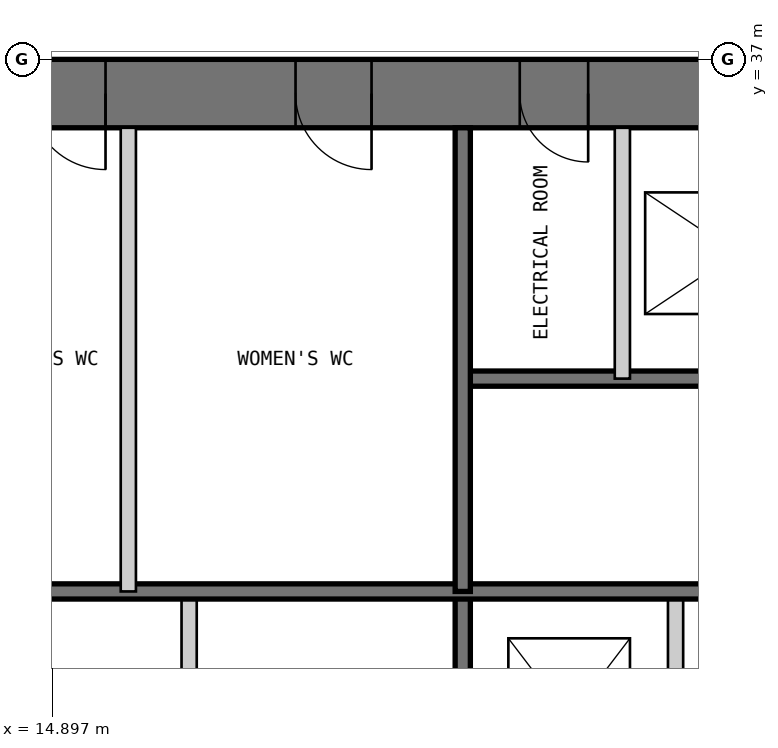
"""IFC4 building model, lengths in metres.
Left out: names, types, materials, properties, quantities, classifications, styles, units other than length and angle.
Written with IfcOpenShell. Run it as: python <this file> out.ifc"""

import sys

from ifc_helpers import new_model, si_unit, direction, frame, frame_2d, origin, place, context, subcontext, project, spatial, polyline, rectangle, outline, extrude, element, fill, save


model = new_model("IFC4")
c1 = context("Model", 3, precision=1e-05, world=origin(), true_north=direction((0.0, 1.0)))
c2 = subcontext(c1, "Body", "Model", "MODEL_VIEW")
j1 = project(units=[si_unit("LENGTHUNIT", "METRE"), si_unit("PLANEANGLEUNIT", "RADIAN")], contexts=[c1])
p1 = place(None, origin())
s1 = spatial("IfcSite", under=j1, at=p1, CompositionType="ELEMENT")
p2 = place(p1, origin())
s2 = spatial("IfcBuilding", under=s1, at=p2, CompositionType="ELEMENT")
p3 = place(p2, frame((0.0, 0.0, 146.4)))
s3 = spatial("IfcBuildingStorey", under=s2, at=p3, CompositionType="ELEMENT", Elevation=146.4)
p4 = place(p3, frame((37.0, 36.55, 0.0), z_axis=(0.0, 0.0, 1.0), x_axis=(-1.0, 0.0, 0.0)))
e1 = element("IfcWall", 1, at=p4, inside=s3, PredefinedType="SHEAR", context=c2, shape_type="SweptSolid", body=[
    extrude(outline(polyline([(0.0, -0.45), (24.0, -0.45), (23.1, 0.45), (0.9, 0.45), (0.0, -0.45)])), origin(), (0.0, 0.0, 1.0), 4.0),
])
p5 = place(p4, frame((4.9, 0.0, 0.0)))
e2 = element("IfcOpeningElement", 2, at=p5, cuts=e1, PredefinedType="OPENING", context=c2, shape_type="SweptSolid", body=[
    extrude(rectangle(XDim=1.0, YDim=2.2, at=frame_2d((0.5, 1.1))), frame((0.0, 0.46, 0.0), z_axis=(0.0, -1.0, 0.0), x_axis=(1.0, 0.0, 0.0)), (0.0, 0.0, 1.0), 0.92),
])
p6 = place(p4, frame((8.9, 0.0, 0.0)))
e3 = element("IfcOpeningElement", 3, at=p6, cuts=e1, PredefinedType="OPENING", context=c2, shape_type="SweptSolid", body=[
    extrude(rectangle(XDim=1.1, YDim=2.2, at=frame_2d((0.55, 1.1))), frame((0.0, 0.46, 0.0), z_axis=(0.0, -1.0, 0.0), x_axis=(1.0, 0.0, 0.0)), (0.0, 0.0, 1.0), 0.92),
])
p7 = place(p4, frame((15.05, 0.0, 0.0)))
e4 = element("IfcOpeningElement", 4, at=p7, cuts=e1, PredefinedType="OPENING", context=c2, shape_type="SweptSolid", body=[
    extrude(rectangle(XDim=0.9, YDim=2.2, at=frame_2d((0.45, 1.1))), frame((0.0, 0.46, 0.0), z_axis=(0.0, -1.0, 0.0), x_axis=(1.0, 0.0, 0.0)), (0.0, 0.0, 1.0), 0.92),
])
p8 = place(p4, frame((17.9, 0.0, 0.0)))
e5 = element("IfcOpeningElement", 5, at=p8, cuts=e1, PredefinedType="OPENING", context=c2, shape_type="SweptSolid", body=[
    extrude(rectangle(XDim=1.0, YDim=2.2, at=frame_2d((0.5, 1.1))), frame((0.0, 0.46, 0.0), z_axis=(0.0, -1.0, 0.0), x_axis=(1.0, 0.0, 0.0)), (0.0, 0.0, 1.0), 0.92),
])
p9 = place(p4, frame((21.4, 0.0, 0.0)))
e6 = element("IfcOpeningElement", 6, at=p9, cuts=e1, PredefinedType="OPENING", context=c2, shape_type="SweptSolid", body=[
    extrude(rectangle(XDim=1.0, YDim=2.2, at=frame_2d((0.5, 1.1))), frame((0.0, 0.46, 0.0), z_axis=(0.0, -1.0, 0.0), x_axis=(1.0, 0.0, 0.0)), (0.0, 0.0, 1.0), 0.92),
])
p10 = place(p3, frame((16.7, 13.9, 0.0), z_axis=(0.0, 0.0, 1.0), x_axis=(0.0, 1.0, 0.0)))
e7 = element("IfcWall", 7, at=p10, inside=s3, PredefinedType="PARTITIONING", context=c2, shape_type="SweptSolid", body=[
    extrude(rectangle(XDim=16.1, YDim=0.2, at=frame_2d((8.05, 0.0))), origin(), (0.0, 0.0, 1.0), 3.8),
])
p11 = place(p10, frame((7.95, 0.0, 0.0)))
e8 = element("IfcOpeningElement", 8, at=p11, cuts=e7, PredefinedType="OPENING", context=c2, shape_type="SweptSolid", body=[
    extrude(rectangle(XDim=0.9, YDim=2.2, at=frame_2d((0.45, 1.1))), frame((0.0, 0.11, 0.0), z_axis=(0.0, -1.0, 0.0), x_axis=(1.0, 0.0, 0.0)), (0.0, 0.0, 1.0), 0.22),
])
p12 = place(p10, frame((12.9, 0.0, 0.0)))
e9 = element("IfcOpeningElement", 9, at=p12, cuts=e7, PredefinedType="OPENING", context=c2, shape_type="SweptSolid", body=[
    extrude(rectangle(XDim=0.9, YDim=2.2, at=frame_2d((0.45, 1.1))), frame((0.0, 0.11, 0.0), z_axis=(0.0, -1.0, 0.0), x_axis=(1.0, 0.0, 0.0)), (0.0, 0.0, 1.0), 0.22),
])
p13 = place(p3, frame((20.3, 13.9, 0.0), z_axis=(0.0, 0.0, 1.0), x_axis=(0.0, 1.0, 0.0)))
e10 = element("IfcWall", 10, at=p13, inside=s3, PredefinedType="SOLIDWALL", context=c2, shape_type="SweptSolid", body=[
    extrude(rectangle(XDim=16.1, YDim=0.2, at=frame_2d((8.05, 0.0))), origin(), (0.0, 0.0, 1.0), 3.8),
])
p14 = place(p13, frame((7.217, 0.0, 0.0)))
e11 = element("IfcOpeningElement", 11, at=p14, cuts=e10, PredefinedType="OPENING", context=c2, shape_type="SweptSolid", body=[
    extrude(rectangle(XDim=1.1, YDim=2.2, at=frame_2d((0.55, 1.1))), frame((0.0, 0.11, 0.0), z_axis=(0.0, -1.0, 0.0), x_axis=(1.0, 0.0, 0.0)), (0.0, 0.0, 1.0), 0.22),
])
p15 = place(p13, frame((10.55, 0.0, 0.0)))
e12 = element("IfcOpeningElement", 12, at=p15, cuts=e10, PredefinedType="OPENING", context=c2, shape_type="SweptSolid", body=[
    extrude(rectangle(XDim=1.1, YDim=2.2, at=frame_2d((0.55, 1.1))), frame((0.0, 0.11, 0.0), z_axis=(0.0, -1.0, 0.0), x_axis=(1.0, 0.0, 0.0)), (0.0, 0.0, 1.0), 0.22),
])
p16 = place(p13, frame((13.883, 0.0, 0.0)))
e13 = element("IfcOpeningElement", 13, at=p16, cuts=e10, PredefinedType="OPENING", context=c2, shape_type="SweptSolid", body=[
    extrude(rectangle(XDim=1.1, YDim=2.2, at=frame_2d((0.55, 1.1))), frame((0.0, 0.11, 0.0), z_axis=(0.0, -1.0, 0.0), x_axis=(1.0, 0.0, 0.0)), (0.0, 0.0, 1.0), 0.22),
])
p17 = place(p3, frame((23.1, 20.0, 0.0), z_axis=(0.0, 0.0, 1.0), x_axis=(0.0, 1.0, 0.0)))
e14 = element("IfcWall", 14, at=p17, inside=s3, PredefinedType="PARTITIONING", context=c2, shape_type="SweptSolid", body=[
    extrude(rectangle(XDim=10.0, YDim=0.2, at=frame_2d((5.0, 0.0))), origin(), (0.0, 0.0, 1.0), 3.8),
])
p18 = place(p3, frame((29.7, 32.8, 0.0), z_axis=(0.0, 0.0, 1.0), x_axis=(-1.0, 0.0, 0.0)))
e15 = element("IfcWall", 15, at=p18, inside=s3, PredefinedType="SOLIDWALL", context=c2, shape_type="SweptSolid", body=[
    extrude(rectangle(XDim=9.4, YDim=0.2, at=frame_2d((4.7, 0.0))), origin(), (0.0, 0.0, 1.0), 3.8),
])
p19 = place(p18, frame((0.25, 0.0, 0.0)))
e16 = element("IfcOpeningElement", 16, at=p19, cuts=e15, PredefinedType="OPENING", context=c2, shape_type="SweptSolid", body=[
    extrude(rectangle(XDim=1.0, YDim=2.2, at=frame_2d((0.5, 1.1))), frame((0.0, 0.11, 0.0), z_axis=(0.0, -1.0, 0.0), x_axis=(1.0, 0.0, 0.0)), (0.0, 0.0, 1.0), 0.22),
])
p20 = place(p3, frame((29.7, 30.0, 0.0), z_axis=(0.0, 0.0, 1.0), x_axis=(-1.0, 0.0, 0.0)))
e17 = element("IfcWall", 17, at=p20, inside=s3, PredefinedType="SOLIDWALL", context=c2, shape_type="SweptSolid", body=[
    extrude(rectangle(XDim=15.8, YDim=0.2, at=frame_2d((7.9, 0.0))), origin(), (0.0, 0.0, 1.0), 3.8),
])
p21 = place(p3, frame((22.4, 36.1, 0.0), z_axis=(0.0, 0.0, 1.0), x_axis=(0.0, -1.0, 0.0)))
e18 = element("IfcWall", 18, at=p21, inside=s3, PredefinedType="PARTITIONING", context=c2, shape_type="SweptSolid", body=[
    extrude(rectangle(XDim=3.3, YDim=0.2, at=frame_2d((1.65, 0.0))), origin(), (0.0, 0.0, 1.0), 3.8),
])
p22 = place(p3, frame((20.3, 36.1, 0.0), z_axis=(0.0, 0.0, 1.0), x_axis=(0.0, -1.0, 0.0)))
e19 = element("IfcWall", 19, at=p22, inside=s3, PredefinedType="SOLIDWALL", context=c2, shape_type="SweptSolid", body=[
    extrude(rectangle(XDim=6.1, YDim=0.2, at=frame_2d((3.05, 0.0))), origin(), (0.0, 0.0, 1.0), 3.8),
])
p23 = place(p3, frame((15.9, 36.1, 0.0), z_axis=(0.0, 0.0, 1.0), x_axis=(0.0, -1.0, 0.0)))
e20 = element("IfcWall", 20, at=p23, inside=s3, PredefinedType="PARTITIONING", context=c2, shape_type="SweptSolid", body=[
    extrude(rectangle(XDim=6.1, YDim=0.2, at=frame_2d((3.05, 0.0))), origin(), (0.0, 0.0, 1.0), 3.8),
])
p24 = place(p7, origin())
e21 = element("IfcDoor", 21, at=p24, inside=s3, OperationType="SINGLE_SWING_LEFT", PredefinedType="DOOR", context=c2, shape_type="SweptSolid", body=[
    extrude(rectangle(XDim=0.9, YDim=2.2, at=frame_2d((0.45, 1.1))), frame((0.0, 0.025, 0.0), z_axis=(0.0, -1.0, 0.0), x_axis=(1.0, 0.0, 0.0)), (0.0, 0.0, 1.0), 0.05),
    extrude(outline(polyline([(0.0, 0.0), (0.04, 0.0), (0.04, 2.16), (0.86, 2.16), (0.86, 0.0), (0.9, 0.0), (0.9, 2.2), (0.0, 2.2), (0.0, 0.0)])), frame((0.0, 0.3, 0.0), z_axis=(0.0, -1.0, 0.0), x_axis=(1.0, 0.0, 0.0)), (0.0, 0.0, 1.0), 0.6),
])
fill(e4, e21)
p25 = place(p8, origin())
e22 = element("IfcDoor", 22, at=p25, inside=s3, OperationType="SINGLE_SWING_LEFT", PredefinedType="DOOR", context=c2, shape_type="SweptSolid", body=[
    extrude(rectangle(XDim=1.0, YDim=2.2, at=frame_2d((0.5, 1.1))), frame((0.0, 0.025, 0.0), z_axis=(0.0, -1.0, 0.0), x_axis=(1.0, 0.0, 0.0)), (0.0, 0.0, 1.0), 0.05),
    extrude(outline(polyline([(0.0, 0.0), (0.04, 0.0), (0.04, 2.16), (0.96, 2.16), (0.96, 0.0), (1.0, 0.0), (1.0, 2.2), (0.0, 2.2), (0.0, 0.0)])), frame((0.0, 0.3, 0.0), z_axis=(0.0, -1.0, 0.0), x_axis=(1.0, 0.0, 0.0)), (0.0, 0.0, 1.0), 0.6),
])
fill(e5, e22)
p26 = place(p9, origin())
e23 = element("IfcDoor", 23, at=p26, inside=s3, OperationType="SINGLE_SWING_LEFT", PredefinedType="DOOR", context=c2, shape_type="SweptSolid", body=[
    extrude(rectangle(XDim=1.0, YDim=2.2, at=frame_2d((0.5, 1.1))), frame((0.0, 0.025, 0.0), z_axis=(0.0, -1.0, 0.0), x_axis=(1.0, 0.0, 0.0)), (0.0, 0.0, 1.0), 0.05),
    extrude(outline(polyline([(0.0, 0.0), (0.04, 0.0), (0.04, 2.16), (0.96, 2.16), (0.96, 0.0), (1.0, 0.0), (1.0, 2.2), (0.0, 2.2), (0.0, 0.0)])), frame((0.0, 0.3, 0.0), z_axis=(0.0, -1.0, 0.0), x_axis=(1.0, 0.0, 0.0)), (0.0, 0.0, 1.0), 0.6),
])
fill(e6, e23)
save(model, sys.argv[1])
